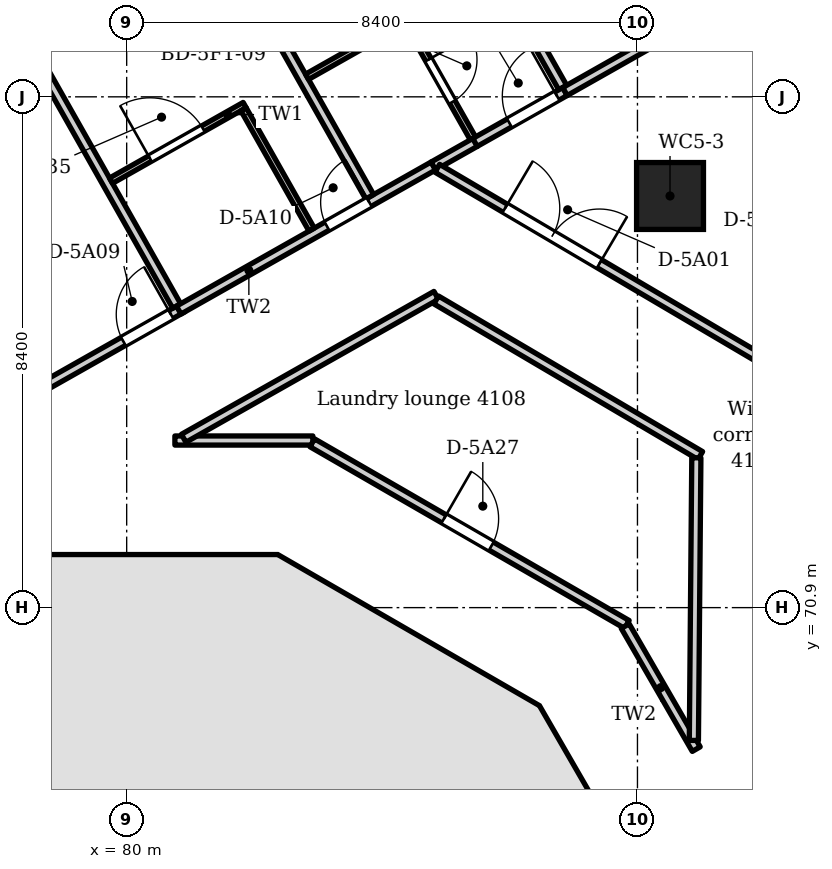
"""IFC4 building model, lengths in metres.
Left out: names, types, materials, properties, quantities, classifications, styles, units other than length and angle.
Written with IfcOpenShell. Run it as: python <this file> out.ifc"""

import sys

from ifc_helpers import new_model, si_unit, direction, frame, frame_2d, origin, origin_2d, place, context, subcontext, project, spatial, polyline, rectangle, circle, outline, extrude, element, fill, save


model = new_model("IFC4")
c1 = context("Model", 3, precision=1e-05, world=origin(), true_north=direction((0.0, 1.0)))
c2 = subcontext(c1, "Body", "Model", "MODEL_VIEW")
j1 = project(units=[si_unit("LENGTHUNIT", "METRE"), si_unit("PLANEANGLEUNIT", "RADIAN")], contexts=[c1])
p1 = place(None, origin())
s1 = spatial("IfcSite", under=j1, at=p1, CompositionType="ELEMENT")
p2 = place(p1, origin())
s2 = spatial("IfcBuilding", under=s1, at=p2, CompositionType="ELEMENT")
p3 = place(p2, frame((0.0, 0.0, 161.1)))
s3 = spatial("IfcBuildingStorey", under=s2, at=p3, CompositionType="ELEMENT", Elevation=161.1)
p4 = place(p3, frame((88.883, 64.76, 0.0), z_axis=(0.0, 0.0, 1.0), x_axis=(-0.500038571144, 0.866003133579, 0.0)))
e1 = element("IfcWall", 1, at=p4, inside=s3, PredefinedType="SHEAR", context=c2, shape_type="SweptSolid", body=[
    extrude(outline(polyline([(0.0, -0.45), (4.969, -0.45), (4.728, 0.45), (0.241, 0.45), (0.0, -0.45)])), origin(), (0.0, 0.0, 1.0), 3.6),
])
p5 = place(p4, frame((1.885, 0.0, 0.0)))
e2 = element("IfcOpeningElement", 2, at=p5, cuts=e1, PredefinedType="OPENING", context=c2, shape_type="SweptSolid", body=[
    extrude(rectangle(XDim=1.2, YDim=2.1, at=frame_2d((0.6, 1.05))), frame((0.0, 0.46, 0.0), z_axis=(0.0, -1.0, 0.0), x_axis=(1.0, 0.0, 0.0)), (0.0, 0.0, 1.0), 0.92),
])
p6 = place(p3, frame((86.563, 68.898, 0.0), z_axis=(0.0, 0.0, 1.0), x_axis=(-0.866003133579, 0.500038571144, 0.0)))
e3 = element("IfcWall", 3, at=p6, inside=s3, PredefinedType="SHEAR", context=c2, shape_type="SweptSolid", body=[
    extrude(outline(polyline([(0.0, -0.45), (4.969, -0.45), (4.728, 0.45), (0.241, 0.45), (0.0, -0.45)])), origin(), (0.0, 0.0, 1.0), 3.6),
])
p7 = place(p6, frame((0.896, 0.0, 0.0)))
e4 = element("IfcOpeningElement", 4, at=p7, cuts=e3, PredefinedType="OPENING", context=c2, shape_type="SweptSolid", body=[
    extrude(rectangle(XDim=0.9, YDim=2.1, at=frame_2d((0.45, 1.05))), frame((0.0, 0.46, 0.0), z_axis=(0.0, -1.0, 0.0), x_axis=(1.0, 0.0, 0.0)), (0.0, 0.0, 1.0), 0.92),
])
p8 = place(p6, frame((3.185, 0.0, 0.0)))
e5 = element("IfcOpeningElement", 5, at=p8, cuts=e3, PredefinedType="OPENING", context=c2, shape_type="SweptSolid", body=[
    extrude(rectangle(XDim=0.9, YDim=2.1, at=frame_2d((0.45, 1.05))), frame((0.0, 0.46, 0.0), z_axis=(0.0, -1.0, 0.0), x_axis=(1.0, 0.0, 0.0)), (0.0, 0.0, 1.0), 0.92),
])
p9 = place(p3, frame((82.485, 71.323, 0.0), z_axis=(0.0, 0.0, 1.0), x_axis=(-1.0, 0.0, 0.0)))
e6 = element("IfcWall", 6, at=p9, inside=s3, PredefinedType="SHEAR", context=c2, shape_type="SweptSolid", body=[
    extrude(outline(polyline([(0.0, -0.45), (4.969, -0.45), (4.728, 0.45), (0.241, 0.45), (0.0, -0.45)])), origin(), (0.0, 0.0, 1.0), 3.6),
])
p10 = place(p9, frame((1.785, 0.0, 0.0)))
e7 = element("IfcOpeningElement", 7, at=p10, cuts=e6, PredefinedType="OPENING", context=c2, shape_type="SweptSolid", body=[
    extrude(rectangle(XDim=1.4, YDim=2.1, at=frame_2d((0.7, 1.05))), frame((0.0, 0.46, 0.0), z_axis=(0.0, -1.0, 0.0), x_axis=(1.0, 0.0, 0.0)), (0.0, 0.0, 1.0), 0.92),
])
p11 = place(p3, frame((82.269, 65.369, 0.0), z_axis=(0.0, 0.0, 1.0), x_axis=(0.865983655544, 0.500072303102, 0.0)))
e8 = element("IfcWall", 8, at=p11, inside=s3, PredefinedType="SHEAR", context=c2, shape_type="SweptSolid", body=[
    extrude(rectangle(XDim=4.973, YDim=0.3, at=frame_2d((2.487, 0.0))), origin(), (0.0, 0.0, 1.0), 3.6),
])
p12 = place(p11, frame((1.351, 0.0, 0.0)))
e9 = element("IfcOpeningElement", 9, at=p12, cuts=e8, PredefinedType="OPENING", context=c2, shape_type="SweptSolid", body=[
    extrude(rectangle(XDim=1.0, YDim=2.1, at=frame_2d((0.5, 1.05))), frame((0.0, 0.16, 0.0), z_axis=(0.0, -1.0, 0.0), x_axis=(1.0, 0.0, 0.0)), (0.0, 0.0, 1.0), 0.32),
])
p13 = place(p3, frame((81.575, 63.001, 0.0), z_axis=(0.0, 0.0, 1.0), x_axis=(0.0, 1.0, 0.0)))
e10 = element("IfcWall", 10, at=p13, inside=s3, PredefinedType="SHEAR", context=c2, shape_type="SweptSolid", body=[
    extrude(rectangle(XDim=7.872, YDim=0.3, at=frame_2d((3.936, 0.0))), origin(), (0.0, 0.0, 1.0), 3.6),
])
p14 = place(p3, frame((88.936, 77.669, -0.35), z_axis=(0.0, 0.0, 1.0), x_axis=(1.0, 0.0, 0.0)))
e11 = element("IfcColumn", 11, at=p14, inside=s3, PredefinedType="COLUMN", context=c2, shape_type="SweptSolid", body=[
    extrude(circle(Radius=0.55, at=origin_2d()), origin(), (0.0, 0.0, 1.0), 3.95),
])
p15 = place(p3, frame((52.498, 66.67, 0.0), z_axis=(0.0, 0.0, 1.0), x_axis=(0.870354973249, 0.492424837453, 0.0)))
e12 = element("IfcWall", 12, at=p15, inside=s3, PredefinedType="SOLIDWALL", context=c2, shape_type="SweptSolid", body=[
    extrude(outline(polyline([(0.149, 0.075), (0.149, -0.075), (43.617, -0.075), (43.617, 0.075), (0.149, 0.075)])), origin(), (0.0, 0.0, 1.0), 3.3),
])
p16 = place(p15, frame((1.224, 0.0, 0.0)))
e13 = element("IfcOpeningElement", 13, at=p16, cuts=e12, PredefinedType="OPENING", context=c2, shape_type="SweptSolid", body=[
    extrude(rectangle(XDim=1.8, YDim=2.6, at=frame_2d((0.9, 1.3))), frame((0.0, 0.085, 0.0), z_axis=(0.0, -1.0, 0.0), x_axis=(1.0, 0.0, 0.0)), (0.0, 0.0, 1.0), 0.17),
])
p17 = place(p15, frame((4.571, 0.0, 0.0)))
e14 = element("IfcOpeningElement", 14, at=p17, cuts=e12, PredefinedType="OPENING", context=c2, shape_type="SweptSolid", body=[
    extrude(rectangle(XDim=1.8, YDim=2.6, at=frame_2d((0.9, 1.3))), frame((0.0, 0.085, 0.0), z_axis=(0.0, -1.0, 0.0), x_axis=(1.0, 0.0, 0.0)), (0.0, 0.0, 1.0), 0.17),
])
p18 = place(p15, frame((8.218, 0.0, 0.0)))
e15 = element("IfcOpeningElement", 15, at=p18, cuts=e12, PredefinedType="OPENING", context=c2, shape_type="SweptSolid", body=[
    extrude(rectangle(XDim=1.8, YDim=2.6, at=frame_2d((0.9, 1.3))), frame((0.0, 0.085, 0.0), z_axis=(0.0, -1.0, 0.0), x_axis=(1.0, 0.0, 0.0)), (0.0, 0.0, 1.0), 0.17),
])
p19 = place(p15, frame((11.865, 0.0, 0.0)))
e16 = element("IfcOpeningElement", 16, at=p19, cuts=e12, PredefinedType="OPENING", context=c2, shape_type="SweptSolid", body=[
    extrude(rectangle(XDim=1.8, YDim=2.6, at=frame_2d((0.9, 1.3))), frame((0.0, 0.085, 0.0), z_axis=(0.0, -1.0, 0.0), x_axis=(1.0, 0.0, 0.0)), (0.0, 0.0, 1.0), 0.17),
])
p20 = place(p15, frame((15.512, 0.0, 0.0)))
e17 = element("IfcOpeningElement", 17, at=p20, cuts=e12, PredefinedType="OPENING", context=c2, shape_type="SweptSolid", body=[
    extrude(rectangle(XDim=1.8, YDim=2.6, at=frame_2d((0.9, 1.3))), frame((0.0, 0.085, 0.0), z_axis=(0.0, -1.0, 0.0), x_axis=(1.0, 0.0, 0.0)), (0.0, 0.0, 1.0), 0.17),
])
p21 = place(p15, frame((19.16, 0.0, 0.0)))
e18 = element("IfcOpeningElement", 18, at=p21, cuts=e12, PredefinedType="OPENING", context=c2, shape_type="SweptSolid", body=[
    extrude(rectangle(XDim=1.8, YDim=2.6, at=frame_2d((0.9, 1.3))), frame((0.0, 0.085, 0.0), z_axis=(0.0, -1.0, 0.0), x_axis=(1.0, 0.0, 0.0)), (0.0, 0.0, 1.0), 0.17),
])
p22 = place(p15, frame((22.807, 0.0, 0.0)))
e19 = element("IfcOpeningElement", 19, at=p22, cuts=e12, PredefinedType="OPENING", context=c2, shape_type="SweptSolid", body=[
    extrude(rectangle(XDim=1.8, YDim=2.6, at=frame_2d((0.9, 1.3))), frame((0.0, 0.085, 0.0), z_axis=(0.0, -1.0, 0.0), x_axis=(1.0, 0.0, 0.0)), (0.0, 0.0, 1.0), 0.17),
])
p23 = place(p15, frame((26.454, 0.0, 0.0)))
e20 = element("IfcOpeningElement", 20, at=p23, cuts=e12, PredefinedType="OPENING", context=c2, shape_type="SweptSolid", body=[
    extrude(rectangle(XDim=1.8, YDim=2.6, at=frame_2d((0.9, 1.3))), frame((0.0, 0.085, 0.0), z_axis=(0.0, -1.0, 0.0), x_axis=(1.0, 0.0, 0.0)), (0.0, 0.0, 1.0), 0.17),
])
p24 = place(p15, frame((30.101, 0.0, 0.0)))
e21 = element("IfcOpeningElement", 21, at=p24, cuts=e12, PredefinedType="OPENING", context=c2, shape_type="SweptSolid", body=[
    extrude(rectangle(XDim=1.8, YDim=2.6, at=frame_2d((0.9, 1.3))), frame((0.0, 0.085, 0.0), z_axis=(0.0, -1.0, 0.0), x_axis=(1.0, 0.0, 0.0)), (0.0, 0.0, 1.0), 0.17),
])
p25 = place(p15, frame((33.748, 0.0, 0.0)))
e22 = element("IfcOpeningElement", 22, at=p25, cuts=e12, PredefinedType="OPENING", context=c2, shape_type="SweptSolid", body=[
    extrude(rectangle(XDim=1.8, YDim=2.6, at=frame_2d((0.9, 1.3))), frame((0.0, 0.085, 0.0), z_axis=(0.0, -1.0, 0.0), x_axis=(1.0, 0.0, 0.0)), (0.0, 0.0, 1.0), 0.17),
])
p26 = place(p15, frame((37.396, 0.0, 0.0)))
e23 = element("IfcOpeningElement", 23, at=p26, cuts=e12, PredefinedType="OPENING", context=c2, shape_type="SweptSolid", body=[
    extrude(rectangle(XDim=1.8, YDim=2.6, at=frame_2d((0.9, 1.3))), frame((0.0, 0.085, 0.0), z_axis=(0.0, -1.0, 0.0), x_axis=(1.0, 0.0, 0.0)), (0.0, 0.0, 1.0), 0.17),
])
p27 = place(p15, frame((40.743, 0.0, 0.0)))
e24 = element("IfcOpeningElement", 24, at=p27, cuts=e12, PredefinedType="OPENING", context=c2, shape_type="SweptSolid", body=[
    extrude(rectangle(XDim=1.8, YDim=2.6, at=frame_2d((0.9, 1.3))), frame((0.0, 0.085, 0.0), z_axis=(0.0, -1.0, 0.0), x_axis=(1.0, 0.0, 0.0)), (0.0, 0.0, 1.0), 0.17),
])
p28 = place(p3, frame((77.064, 73.648, 0.0), z_axis=(0.0, 0.0, 1.0), x_axis=(0.870327135276, 0.492474037491, 0.0)))
e25 = element("IfcWall", 25, at=p28, inside=s3, PredefinedType="PARTITIONING", context=c2, shape_type="SweptSolid", body=[
    extrude(rectangle(XDim=4.439, YDim=0.15, at=frame_2d((2.219, 0.0))), origin(), (0.0, 0.0, 1.0), 3.3),
])
p29 = place(p28, frame((3.31, 0.0, 0.0)))
e26 = element("IfcOpeningElement", 26, at=p29, cuts=e25, PredefinedType="OPENING", context=c2, shape_type="SweptSolid", body=[
    extrude(rectangle(XDim=0.9, YDim=2.1, at=frame_2d((0.45, 1.05))), frame((0.0, 0.085, 0.0), z_axis=(0.0, -1.0, 0.0), x_axis=(1.0, 0.0, 0.0)), (0.0, 0.0, 1.0), 0.17),
])
p30 = place(p3, frame((77.93, 80.973, 0.0), z_axis=(0.0, 0.0, 1.0), x_axis=(0.4923790567, -0.870380873252, 0.0)))
e27 = element("IfcWall", 27, at=p30, inside=s3, PredefinedType="PARTITIONING", context=c2, shape_type="SweptSolid", body=[
    extrude(rectangle(XDim=5.874, YDim=0.15, at=frame_2d((2.937, 0.0))), origin(), (0.0, 0.0, 1.0), 3.3),
])
p31 = place(p3, frame((79.742, 77.921, 0.0), z_axis=(0.0, 0.0, 1.0), x_axis=(0.870364731179, 0.49240759003, 0.0)))
e28 = element("IfcWall", 28, at=p31, inside=s3, PredefinedType="PARTITIONING", context=c2, shape_type="SweptSolid", body=[
    extrude(rectangle(XDim=2.526, YDim=0.1, at=frame_2d((1.263, 0.0))), origin(), (0.0, 0.0, 1.0), 3.3),
])
p32 = place(p31, frame((0.738, 0.0, 0.0)))
e29 = element("IfcOpeningElement", 29, at=p32, cuts=e28, PredefinedType="OPENING", context=c2, shape_type="SweptSolid", body=[
    extrude(rectangle(XDim=1.0, YDim=2.1, at=frame_2d((0.5, 1.05))), frame((0.0, 0.06, 0.0), z_axis=(0.0, -1.0, 0.0), x_axis=(1.0, 0.0, 0.0)), (0.0, 0.0, 1.0), 0.12),
])
p33 = place(p3, frame((80.856, 75.793, 0.0), z_axis=(0.0, 0.0, 1.0), x_axis=(0.870296246949, 0.492528621043, 0.0)))
e30 = element("IfcWall", 30, at=p33, inside=s3, PredefinedType="PARTITIONING", context=c2, shape_type="SweptSolid", body=[
    extrude(rectangle(XDim=4.812, YDim=0.15, at=frame_2d((2.406, 0.0))), origin(), (0.0, 0.0, 1.0), 3.3),
])
p34 = place(p33, frame((2.801, 0.0, 0.0)))
e31 = element("IfcOpeningElement", 31, at=p34, cuts=e30, PredefinedType="OPENING", context=c2, shape_type="SweptSolid", body=[
    extrude(rectangle(XDim=0.8, YDim=2.1, at=frame_2d((0.4, 1.05))), frame((0.0, 0.085, 0.0), z_axis=(0.0, -1.0, 0.0), x_axis=(1.0, 0.0, 0.0)), (0.0, 0.0, 1.0), 0.17),
])
p35 = place(p3, frame((80.793, 73.648, 0.0), z_axis=(0.0, 0.0, 1.0), x_axis=(1.0, 0.0, 0.0)))
e32 = element("IfcWall", 32, at=p35, inside=s3, PredefinedType="PARTITIONING", context=c2, shape_type="SweptSolid", body=[
    extrude(rectangle(XDim=2.269, YDim=0.15, at=frame_2d((1.135, 0.0))), origin(), (0.0, 0.0, 1.0), 3.3),
])
p36 = place(p3, frame((80.937, 73.685, 0.0), z_axis=(0.0, 0.0, 1.0), x_axis=(0.870319748897, 0.492487090876, 0.0)))
e33 = element("IfcWall", 33, at=p36, inside=s3, PredefinedType="PARTITIONING", context=c2, shape_type="SweptSolid", body=[
    extrude(rectangle(XDim=4.772, YDim=0.15, at=frame_2d((2.386, 0.0))), origin(), (0.0, 0.0, 1.0), 3.3),
])
p37 = place(p3, frame((81.104, 82.769, 0.0), z_axis=(0.0, 0.0, 1.0), x_axis=(0.492361245758, -0.870390948756, 0.0)))
e34 = element("IfcWall", 34, at=p37, inside=s3, PredefinedType="PARTITIONING", context=c2, shape_type="SweptSolid", body=[
    extrude(rectangle(XDim=5.875, YDim=0.15, at=frame_2d((2.937, 0.0))), origin(), (0.0, 0.0, 1.0), 3.3),
])
p38 = place(p3, frame((81.922, 79.096, 0.0), z_axis=(0.0, 0.0, 1.0), x_axis=(0.492424941649, -0.870354914298, 0.0)))
e35 = element("IfcWall", 35, at=p38, inside=s3, PredefinedType="PARTITIONING", context=c2, shape_type="SweptSolid", body=[
    extrude(rectangle(XDim=2.275, YDim=0.1, at=frame_2d((1.138, 0.0))), origin(), (0.0, 0.0, 1.0), 3.3),
])
p39 = place(p3, frame((82.966, 79.63, 0.0), z_axis=(0.0, 0.0, 1.0), x_axis=(0.870373787042, 0.492391582818, 0.0)))
e36 = element("IfcWall", 36, at=p39, inside=s3, PredefinedType="PARTITIONING", context=c2, shape_type="SweptSolid", body=[
    extrude(rectangle(XDim=1.925, YDim=0.1, at=frame_2d((0.962, 0.0))), origin(), (0.0, 0.0, 1.0), 3.3),
])
p40 = place(p3, frame((83.052, 73.611, 0.0), z_axis=(0.0, 0.0, 1.0), x_axis=(0.866039280689, -0.499975963725, 0.0)))
e37 = element("IfcWall", 37, at=p40, inside=s3, PredefinedType="PARTITIONING", context=c2, shape_type="SweptSolid", body=[
    extrude(rectangle(XDim=5.974, YDim=0.15, at=frame_2d((2.987, 0.0))), origin(), (0.0, 0.0, 1.0), 2.75),
])
p41 = place(p40, frame((2.5, 0.0, 0.0)))
e38 = element("IfcOpeningElement", 38, at=p41, cuts=e37, PredefinedType="OPENING", context=c2, shape_type="SweptSolid", body=[
    extrude(rectangle(XDim=0.9, YDim=2.1, at=frame_2d((0.45, 1.05))), frame((0.0, 0.085, 0.0), z_axis=(0.0, -1.0, 0.0), x_axis=(1.0, 0.0, 0.0)), (0.0, 0.0, 1.0), 0.17),
])
p42 = place(p3, frame((84.279, 84.565, 0.0), z_axis=(0.0, 0.0, 1.0), x_axis=(0.4923790567, -0.870380873252, 0.0)))
e39 = element("IfcWall", 39, at=p42, inside=s3, PredefinedType="PARTITIONING", context=c2, shape_type="SweptSolid", body=[
    extrude(rectangle(XDim=5.874, YDim=0.15, at=frame_2d((2.937, 0.0))), origin(), (0.0, 0.0, 1.0), 3.3),
])
p43 = place(p3, frame((84.623, 80.51, 0.0), z_axis=(0.0, 0.0, 1.0), x_axis=(0.492545299704, -0.870286807748, 0.0)))
e40 = element("IfcWall", 40, at=p43, inside=s3, PredefinedType="PARTITIONING", context=c2, shape_type="SweptSolid", body=[
    extrude(rectangle(XDim=2.176, YDim=0.1, at=frame_2d((1.088, 0.0))), origin(), (0.0, 0.0, 1.0), 3.3),
])
p44 = place(p43, frame((0.688, 0.0, 0.0)))
e41 = element("IfcOpeningElement", 41, at=p44, cuts=e40, PredefinedType="OPENING", context=c2, shape_type="SweptSolid", body=[
    extrude(rectangle(XDim=0.8, YDim=2.1, at=frame_2d((0.4, 1.05))), frame((0.0, 0.06, 0.0), z_axis=(0.0, -1.0, 0.0), x_axis=(1.0, 0.0, 0.0)), (0.0, 0.0, 1.0), 0.12),
])
p45 = place(p3, frame((85.09, 75.96, 0.0), z_axis=(0.0, 0.0, 1.0), x_axis=(0.861605399292, -0.507578699229, 0.0)))
e42 = element("IfcWall", 42, at=p45, inside=s3, PredefinedType="PARTITIONING", context=c2, shape_type="SweptSolid", body=[
    extrude(rectangle(XDim=5.042, YDim=0.15, at=frame_2d((2.521, 0.0))), origin(), (0.0, 0.0, 1.0), 2.75),
])
p46 = place(p3, frame((85.044, 78.163, 0.0), z_axis=(0.0, 0.0, 1.0), x_axis=(0.870602999544, 0.491986196133, 0.0)))
e43 = element("IfcWall", 43, at=p46, inside=s3, PredefinedType="PARTITIONING", context=c2, shape_type="SweptSolid", body=[
    extrude(rectangle(XDim=0.792, YDim=0.15, at=frame_2d((0.396, 0.0))), origin(), (0.0, 0.0, 1.0), 3.3),
])
p47 = place(p3, frame((85.109, 78.125, 0.0), z_axis=(0.0, 0.0, 1.0), x_axis=(0.861598717736, -0.507590040875, 0.0)))
e44 = element("IfcWall", 44, at=p47, inside=s3, PredefinedType="PARTITIONING", context=c2, shape_type="SweptSolid", body=[
    extrude(rectangle(XDim=7.056, YDim=0.15, at=frame_2d((3.528, 0.0))), origin(), (0.0, 0.0, 1.0), 2.75),
])
p48 = place(p47, frame((1.293, 0.0, 0.0)))
e45 = element("IfcOpeningElement", 45, at=p48, cuts=e44, PredefinedType="OPENING", context=c2, shape_type="SweptSolid", body=[
    extrude(rectangle(XDim=1.8, YDim=2.1, at=frame_2d((0.9, 1.05))), frame((0.0, 0.085, 0.0), z_axis=(0.0, -1.0, 0.0), x_axis=(1.0, 0.0, 0.0)), (0.0, 0.0, 1.0), 0.17),
])
p49 = place(p3, frame((85.728, 78.55, 0.0), z_axis=(0.0, 0.0, 1.0), x_axis=(0.870461194111, 0.492237046093, 0.0)))
e46 = element("IfcWall", 46, at=p49, inside=s3, PredefinedType="PARTITIONING", context=c2, shape_type="SweptSolid", body=[
    extrude(rectangle(XDim=1.7, YDim=0.15, at=frame_2d((0.85, 0.0))), origin(), (0.0, 0.0, 1.0), 3.3),
])
p50 = place(p49, frame((0.65, 0.0, 0.0)))
e47 = element("IfcOpeningElement", 47, at=p50, cuts=e46, PredefinedType="OPENING", context=c2, shape_type="SweptSolid", body=[
    extrude(rectangle(XDim=0.9, YDim=2.1, at=frame_2d((0.45, 1.05))), frame((0.0, 0.085, 0.0), z_axis=(0.0, -1.0, 0.0), x_axis=(1.0, 0.0, 0.0)), (0.0, 0.0, 1.0), 0.17),
])
p51 = place(p3, frame((87.208, 79.387, 0.0), z_axis=(0.0, 0.0, 1.0), x_axis=(0.87020157879, 0.492695861837, 0.0)))
e48 = element("IfcWall", 48, at=p51, inside=s3, PredefinedType="PARTITIONING", context=c2, shape_type="SweptSolid", body=[
    extrude(rectangle(XDim=1.751, YDim=0.15, at=frame_2d((0.875, 0.0))), origin(), (0.0, 0.0, 1.0), 3.3),
])
p52 = place(p3, frame((88.198, 70.596, 0.0), z_axis=(0.0, 0.0, 1.0), x_axis=(0.500005931509, -0.866021979199, 0.0)))
e49 = element("IfcWall", 49, at=p52, inside=s3, PredefinedType="PARTITIONING", context=c2, shape_type="SweptSolid", body=[
    extrude(rectangle(XDim=2.336, YDim=0.15, at=frame_2d((1.168, 0.0))), origin(), (0.0, 0.0, 1.0), 3.3),
])
p53 = place(p3, frame((89.328, 68.716, 0.0), z_axis=(0.0, 0.0, 1.0), x_axis=(0.008771592358, 0.999961528844, 0.0)))
e50 = element("IfcWall", 50, at=p53, inside=s3, PredefinedType="PARTITIONING", context=c2, shape_type="SweptSolid", body=[
    extrude(rectangle(XDim=4.648, YDim=0.15, at=frame_2d((2.324, 0.0))), origin(), (0.0, 0.0, 1.0), 3.3),
])
p54 = place(p3, frame((84.186, 69.751, 0.0), z_axis=(0.0, 0.0, 1.0), x_axis=(-0.499890179513, -0.866088799389, 0.0)))
e51 = element("IfcWall", 51, at=p54, inside=s3, PredefinedType="PARTITIONING", context=c2, shape_type="SweptSolid", body=[
    extrude(rectangle(XDim=0.882, YDim=0.15, at=frame_2d((0.441, 0.0))), origin(), (0.0, 0.0, 1.0), 3.3),
])
p55 = place(p3, frame((81.775, 68.028, 0.0), z_axis=(0.0, 0.0, 1.0), x_axis=(0.866130725101, 0.499817533742, 0.0)))
e52 = element("IfcWall", 52, at=p55, inside=s3, PredefinedType="PARTITIONING", context=c2, shape_type="SweptSolid", body=[
    extrude(rectangle(XDim=2.149, YDim=0.2, at=frame_2d((1.074, 0.0))), origin(), (0.0, 0.0, 1.0), 3.3),
])
p56 = place(p3, frame((84.749, 66.974, 0.0), z_axis=(0.0, 0.0, 1.0), x_axis=(-0.500136062276, 0.86594683394, 0.0)))
e53 = element("IfcWall", 53, at=p56, inside=s3, PredefinedType="PARTITIONING", context=c2, shape_type="SweptSolid", body=[
    extrude(rectangle(XDim=2.299, YDim=0.2, at=frame_2d((1.149, 0.0))), origin(), (0.0, 0.0, 1.0), 3.3),
])
p57 = place(p48, origin())
e54 = element("IfcDoor", 54, at=p57, inside=s3, OperationType="DOUBLE_DOOR_DOUBLE_SWING", PredefinedType="DOOR", context=c2, shape_type="SweptSolid", body=[
    extrude(rectangle(XDim=1.8, YDim=2.1, at=frame_2d((0.9, 1.05))), frame((0.0, 0.025, 0.0), z_axis=(0.0, -1.0, 0.0), x_axis=(1.0, 0.0, 0.0)), (0.0, 0.0, 1.0), 0.05),
])
fill(e45, e54)
p58 = place(p29, origin())
e55 = element("IfcDoor", 55, at=p58, inside=s3, OperationType="SINGLE_SWING_RIGHT", PredefinedType="DOOR", context=c2, shape_type="SweptSolid", body=[
    extrude(rectangle(XDim=0.9, YDim=2.1, at=frame_2d((0.45, 1.05))), frame((0.0, 0.025, 0.0), z_axis=(0.0, -1.0, 0.0), x_axis=(1.0, 0.0, 0.0)), (0.0, 0.0, 1.0), 0.05),
])
fill(e26, e55)
p59 = place(p34, origin())
e56 = element("IfcDoor", 56, at=p59, inside=s3, OperationType="SINGLE_SWING_RIGHT", PredefinedType="DOOR", context=c2, shape_type="SweptSolid", body=[
    extrude(rectangle(XDim=0.8, YDim=2.1, at=frame_2d((0.4, 1.05))), frame((0.0, 0.025, 0.0), z_axis=(0.0, -1.0, 0.0), x_axis=(1.0, 0.0, 0.0)), (0.0, 0.0, 1.0), 0.05),
])
fill(e31, e56)
p60 = place(p50, origin())
e57 = element("IfcDoor", 57, at=p60, inside=s3, OperationType="SINGLE_SWING_RIGHT", PredefinedType="DOOR", context=c2, shape_type="SweptSolid", body=[
    extrude(rectangle(XDim=0.9, YDim=2.1, at=frame_2d((0.45, 1.05))), frame((0.0, 0.025, 0.0), z_axis=(0.0, -1.0, 0.0), x_axis=(1.0, 0.0, 0.0)), (0.0, 0.0, 1.0), 0.05),
])
fill(e47, e57)
p61 = place(p41, origin())
e58 = element("IfcDoor", 58, at=p61, inside=s3, OperationType="SINGLE_SWING_LEFT", PredefinedType="DOOR", context=c2, shape_type="SweptSolid", body=[
    extrude(rectangle(XDim=0.9, YDim=2.1, at=frame_2d((0.45, 1.05))), frame((0.0, 0.025, 0.0), z_axis=(0.0, -1.0, 0.0), x_axis=(1.0, 0.0, 0.0)), (0.0, 0.0, 1.0), 0.05),
])
fill(e38, e58)
p62 = place(p32, origin())
e59 = element("IfcDoor", 59, at=p62, inside=s3, OperationType="SINGLE_SWING_LEFT", PredefinedType="DOOR", context=c2, shape_type="SweptSolid", body=[
    extrude(rectangle(XDim=1.0, YDim=2.1, at=frame_2d((0.5, 1.05))), frame((0.0, 0.025, 0.0), z_axis=(0.0, -1.0, 0.0), x_axis=(1.0, 0.0, 0.0)), (0.0, 0.0, 1.0), 0.05),
])
fill(e29, e59)
p63 = place(p44, origin())
e60 = element("IfcDoor", 60, at=p63, inside=s3, OperationType="SINGLE_SWING_LEFT", PredefinedType="DOOR", context=c2, shape_type="SweptSolid", body=[
    extrude(rectangle(XDim=0.8, YDim=2.1, at=frame_2d((0.4, 1.05))), frame((0.0, 0.025, 0.0), z_axis=(0.0, -1.0, 0.0), x_axis=(1.0, 0.0, 0.0)), (0.0, 0.0, 1.0), 0.05),
])
fill(e41, e60)
p64 = place(p10, origin())
e61 = element("IfcDoor", 61, at=p64, inside=s3, OperationType="DOUBLE_DOOR_SINGLE_SWING", PredefinedType="DOOR", context=c2, shape_type="SweptSolid", body=[
    extrude(rectangle(XDim=1.4, YDim=2.1, at=frame_2d((0.7, 1.05))), frame((0.0, 0.025, 0.0), z_axis=(0.0, -1.0, 0.0), x_axis=(1.0, 0.0, 0.0)), (0.0, 0.0, 1.0), 0.05),
])
fill(e7, e61)
p65 = place(p7, origin())
e62 = element("IfcDoor", 62, at=p65, inside=s3, OperationType="SINGLE_SWING_LEFT", PredefinedType="DOOR", context=c2, shape_type="SweptSolid", body=[
    extrude(rectangle(XDim=0.9, YDim=2.1, at=frame_2d((0.45, 1.05))), frame((0.0, 0.175, 0.0), z_axis=(0.0, -1.0, 0.0), x_axis=(1.0, 0.0, 0.0)), (0.0, 0.0, 1.0), 0.05),
])
fill(e4, e62)
p66 = place(p8, origin())
e63 = element("IfcDoor", 63, at=p66, inside=s3, OperationType="SINGLE_SWING_RIGHT", PredefinedType="DOOR", context=c2, shape_type="SweptSolid", body=[
    extrude(rectangle(XDim=0.9, YDim=2.1, at=frame_2d((0.45, 1.05))), frame((0.0, 0.175, 0.0), z_axis=(0.0, -1.0, 0.0), x_axis=(1.0, 0.0, 0.0)), (0.0, 0.0, 1.0), 0.05),
])
fill(e5, e63)
save(model, sys.argv[1])
